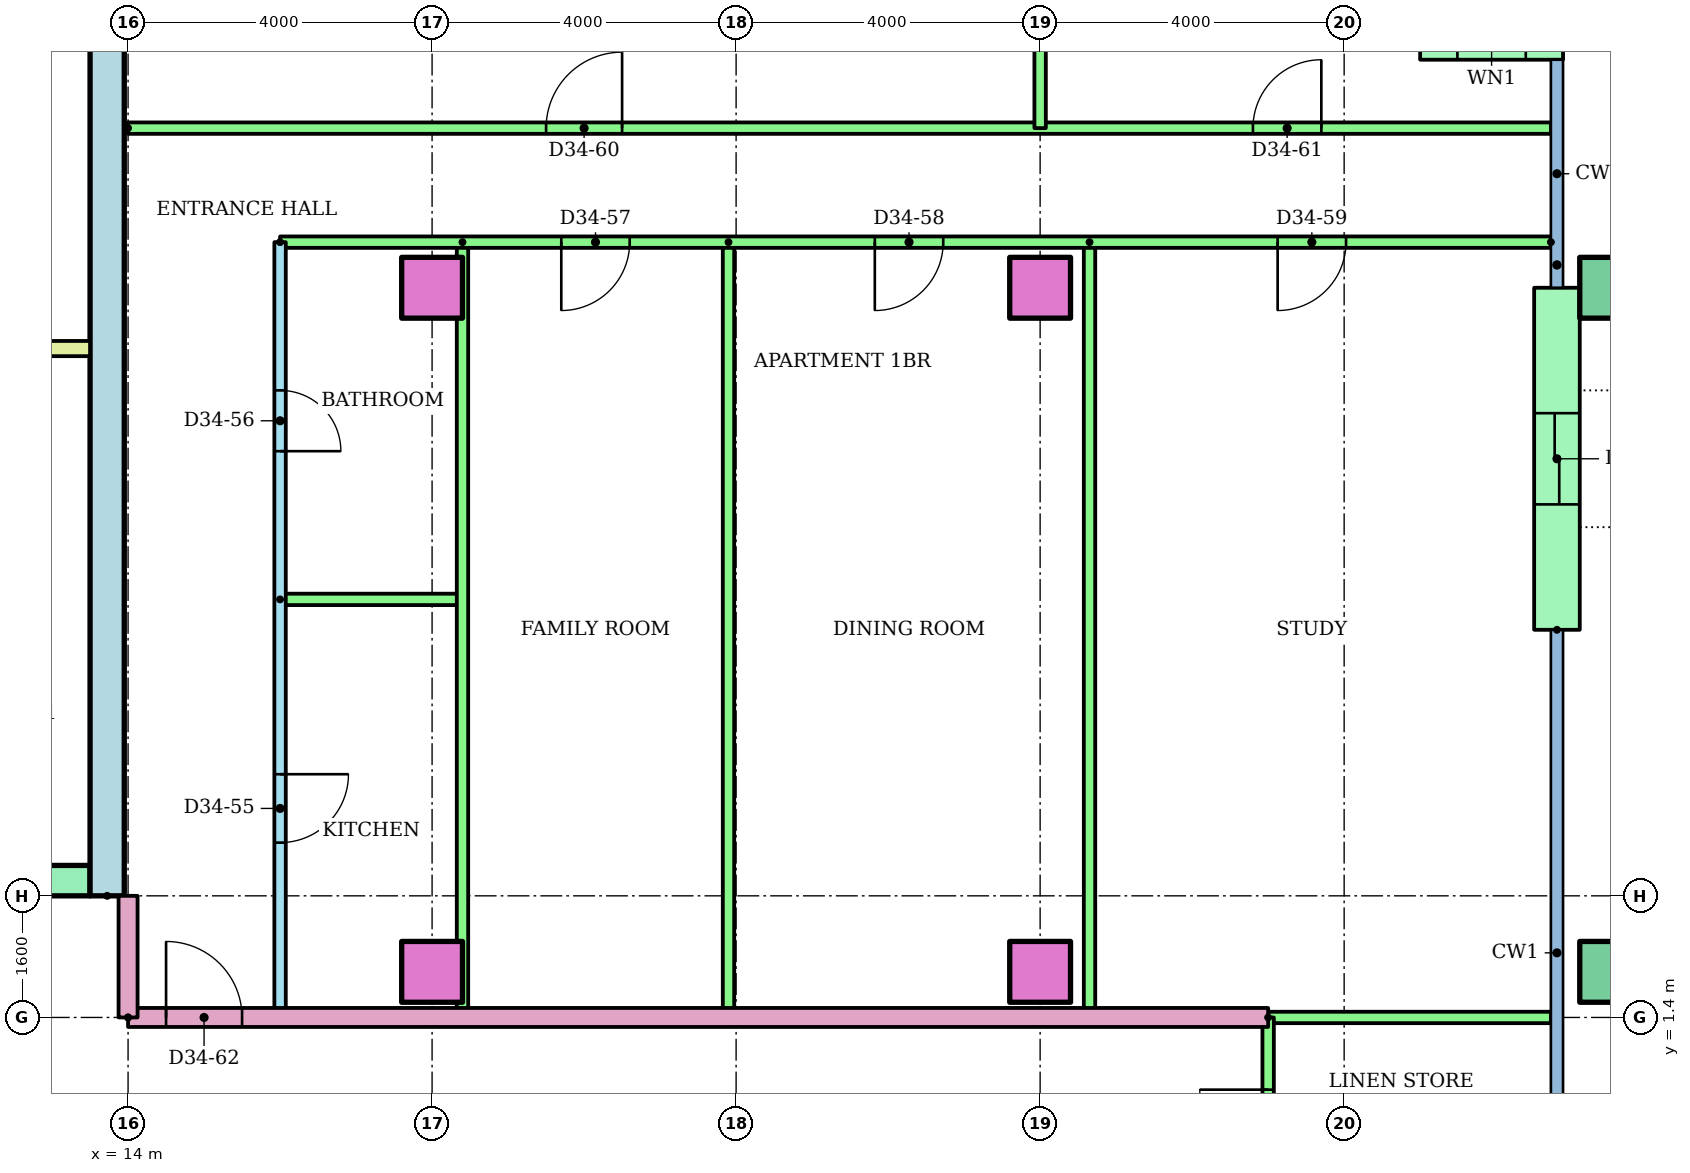
"""IFC4 building model, lengths in metres.
Left out: names, types, materials, properties, quantities, classifications, styles, units other than length and angle.
Written with IfcOpenShell. Run it as: python <this file> out.ifc"""

import sys

from ifc_helpers import new_model, si_unit, direction, frame, frame_2d, origin, origin_2d, place, context, subcontext, project, spatial, rectangle, hollow_rectangle, extrude, element, fill, save


model = new_model("IFC4")
c1 = context("Model", 3, precision=1e-05, world=origin(), true_north=direction((0.0, 1.0)))
c2 = subcontext(c1, "Body", "Model", "MODEL_VIEW")
j1 = project(units=[si_unit("LENGTHUNIT", "METRE"), si_unit("PLANEANGLEUNIT", "RADIAN")], contexts=[c1])
p1 = place(None, origin())
s1 = spatial("IfcSite", under=j1, at=p1, CompositionType="ELEMENT")
p2 = place(p1, origin())
s2 = spatial("IfcBuilding", under=s1, at=p2, CompositionType="ELEMENT")
p3 = place(p2, frame((0.0, 0.0, 132.6)))
s3 = spatial("IfcBuildingStorey", under=s2, at=p3, CompositionType="ELEMENT", Elevation=132.6)
for number, where in (
    (1, (18.0, 2.0, 0.0)),
    (2, (26.0, 2.0, 0.0)),
):
    element("IfcColumn", number, at=place(p3, frame(where)), inside=s3, PredefinedType="COLUMN", context=c2, shape_type="SweptSolid", body=[
        extrude(rectangle(XDim=0.8, YDim=0.8, at=origin_2d()), origin(), (0.0, 0.0, 1.0), 3.2),
    ])
p4 = place(p3, frame((33.5, 2.0, 0.0)))
e3 = element("IfcColumn", 3, at=p4, inside=s3, PredefinedType="COLUMN", context=c2, shape_type="SweptSolid", body=[
    extrude(hollow_rectangle(XDim=0.8, YDim=0.8, WallThickness=0.04, at=origin_2d()), origin(), (0.0, 0.0, 1.0), 3.2),
])
for number, where in (
    (4, (18.0, 11.0, 0.0)),
    (5, (26.0, 11.0, 0.0)),
):
    element("IfcColumn", number, at=place(p3, frame(where)), inside=s3, PredefinedType="COLUMN", context=c2, shape_type="SweptSolid", body=[
        extrude(rectangle(XDim=0.8, YDim=0.8, at=origin_2d()), origin(), (0.0, 0.0, 1.0), 3.2),
    ])
p5 = place(p3, frame((33.5, 11.0, 0.0)))
e6 = element("IfcColumn", 6, at=p5, inside=s3, PredefinedType="COLUMN", context=c2, shape_type="SweptSolid", body=[
    extrude(hollow_rectangle(XDim=0.8, YDim=0.8, WallThickness=0.04, at=origin_2d()), origin(), (0.0, 0.0, 1.0), 3.2),
])
p6 = place(p3, frame((32.88, 14.3, 0.0), z_axis=(0.0, 0.0, 1.0), x_axis=(-1.0, 0.0, 0.0)))
e7 = element("IfcWall", 7, at=p6, inside=s3, PredefinedType="STANDARD", context=c2, shape_type="SweptSolid", body=[
    extrude(rectangle(XDim=1.88, YDim=0.6, at=frame_2d((0.94, 0.0))), origin(), (0.0, 0.0, 1.0), 2.92),
])
p7 = place(p6, frame((0.49, 0.0, 0.9)))
e8 = element("IfcOpeningElement", 8, at=p7, cuts=e7, PredefinedType="OPENING", context=c2, shape_type="SweptSolid", body=[
    extrude(rectangle(XDim=0.9, YDim=1.5, at=frame_2d((0.45, 0.75))), frame((0.0, 0.31, 0.0), z_axis=(0.0, -1.0, 0.0), x_axis=(1.0, 0.0, 0.0)), (0.0, 0.0, 1.0), 0.62),
])
p8 = place(p3, frame((32.8, 6.5, 0.0), z_axis=(0.0, 0.0, 1.0), x_axis=(0.0, 1.0, 0.0)))
e9 = element("IfcWall", 9, at=p8, inside=s3, PredefinedType="STANDARD", context=c2, shape_type="SweptSolid", body=[
    extrude(rectangle(XDim=4.5, YDim=0.6, at=frame_2d((2.25, 0.0))), origin(), (0.0, 0.0, 1.0), 2.92),
])
p9 = place(p8, frame((1.65, 0.0, 0.0)))
e10 = element("IfcOpeningElement", 10, at=p9, cuts=e9, PredefinedType="OPENING", context=c2, shape_type="SweptSolid", body=[
    extrude(rectangle(XDim=1.2, YDim=2.1, at=frame_2d((0.6, 1.05))), frame((0.0, 0.31, 0.0), z_axis=(0.0, -1.0, 0.0), x_axis=(1.0, 0.0, 0.0)), (0.0, 0.0, 1.0), 0.62),
])
p10 = place(p3, frame((13.725, 3.0, 0.0), z_axis=(0.0, 0.0, 1.0), x_axis=(0.0, 1.0, 0.0)))
e11 = element("IfcWall", 11, at=p10, inside=s3, PredefinedType="SHEAR", context=c2, shape_type="SweptSolid", body=[
    extrude(rectangle(XDim=17.0, YDim=0.45, at=frame_2d((8.5, 0.0))), origin(), (0.0, 0.0, 1.0), 2.92),
])
p11 = place(p3, frame((-13.5, 3.2, 0.0)))
e12 = element("IfcWall", 12, at=p11, inside=s3, PredefinedType="SHEAR", context=c2, shape_type="SweptSolid", body=[
    extrude(rectangle(XDim=27.0, YDim=0.4, at=frame_2d((13.5, 0.0))), origin(), (0.0, 0.0, 1.0), 2.92),
])
p12 = place(p11, frame((6.861, 0.0, 0.0)))
e13 = element("IfcOpeningElement", 13, at=p12, cuts=e12, PredefinedType="OPENING", context=c2, shape_type="SweptSolid", body=[
    extrude(rectangle(XDim=1.1, YDim=2.1, at=frame_2d((0.55, 1.05))), frame((0.0, 0.21, 0.0), z_axis=(0.0, -1.0, 0.0), x_axis=(1.0, 0.0, 0.0)), (0.0, 0.0, 1.0), 0.42),
])
p13 = place(p11, frame((9.906, 0.0, 0.0)))
e14 = element("IfcOpeningElement", 14, at=p13, cuts=e12, PredefinedType="OPENING", context=c2, shape_type="SweptSolid", body=[
    extrude(rectangle(XDim=1.1, YDim=2.1, at=frame_2d((0.55, 1.05))), frame((0.0, 0.21, 0.0), z_axis=(0.0, -1.0, 0.0), x_axis=(1.0, 0.0, 0.0)), (0.0, 0.0, 1.0), 0.42),
])
p14 = place(p11, frame((15.994, 0.0, 0.0)))
e15 = element("IfcOpeningElement", 15, at=p14, cuts=e12, PredefinedType="OPENING", context=c2, shape_type="SweptSolid", body=[
    extrude(rectangle(XDim=1.1, YDim=2.1, at=frame_2d((0.55, 1.05))), frame((0.0, 0.21, 0.0), z_axis=(0.0, -1.0, 0.0), x_axis=(1.0, 0.0, 0.0)), (0.0, 0.0, 1.0), 0.42),
])
p15 = place(p11, frame((19.039, 0.0, 0.0)))
e16 = element("IfcOpeningElement", 16, at=p15, cuts=e12, PredefinedType="OPENING", context=c2, shape_type="SweptSolid", body=[
    extrude(rectangle(XDim=1.1, YDim=2.1, at=frame_2d((0.55, 1.05))), frame((0.0, 0.21, 0.0), z_axis=(0.0, -1.0, 0.0), x_axis=(1.0, 0.0, 0.0)), (0.0, 0.0, 1.0), 0.42),
])
p16 = place(p11, frame((12.6, 0.0, 0.0)))
e17 = element("IfcOpeningElement", 17, at=p16, cuts=e12, PredefinedType="OPENING", context=c2, shape_type="SweptSolid", body=[
    extrude(rectangle(XDim=1.8, YDim=2.1, at=frame_2d((0.9, 1.05))), frame((0.0, 0.21, 0.0), z_axis=(0.0, -1.0, 0.0), x_axis=(1.0, 0.0, 0.0)), (0.0, 0.0, 1.0), 0.42),
])
p17 = place(p3, frame((9.6, 10.2, 0.0)))
e18 = element("IfcWall", 18, at=p17, inside=s3, PredefinedType="PARTITIONING", context=c2, shape_type="SweptSolid", body=[
    extrude(rectangle(XDim=3.9, YDim=0.2, at=frame_2d((1.95, 0.0))), origin(), (0.0, 0.0, 1.0), 2.92),
])
p18 = place(p3, frame((16.0, 11.6, 0.0), z_axis=(0.0, 0.0, 1.0), x_axis=(0.0, -1.0, 0.0)))
e19 = element("IfcWall", 19, at=p18, inside=s3, PredefinedType="PARTITIONING", context=c2, shape_type="SweptSolid", body=[
    extrude(rectangle(XDim=10.2, YDim=0.15, at=frame_2d((5.1, 0.0))), origin(), (0.0, 0.0, 1.0), 2.4),
])
p19 = place(p18, frame((7.0, 0.0, 0.0)))
e20 = element("IfcOpeningElement", 20, at=p19, cuts=e19, PredefinedType="OPENING", context=c2, shape_type="SweptSolid", body=[
    extrude(rectangle(XDim=0.9, YDim=2.1, at=frame_2d((0.45, 1.05))), frame((0.0, 0.085, 0.0), z_axis=(0.0, -1.0, 0.0), x_axis=(1.0, 0.0, 0.0)), (0.0, 0.0, 1.0), 0.17),
])
p20 = place(p18, frame((1.95, 0.0, 0.0)))
e21 = element("IfcOpeningElement", 21, at=p20, cuts=e19, PredefinedType="OPENING", context=c2, shape_type="SweptSolid", body=[
    extrude(rectangle(XDim=0.8, YDim=2.1, at=frame_2d((0.4, 1.05))), frame((0.0, 0.085, 0.0), z_axis=(0.0, -1.0, 0.0), x_axis=(1.0, 0.0, 0.0)), (0.0, 0.0, 1.0), 0.17),
])
p21 = place(p3, frame((16.0, 6.9, 0.0)))
e22 = element("IfcWall", 22, at=p21, inside=s3, PredefinedType="PARTITIONING", context=c2, shape_type="SweptSolid", body=[
    extrude(rectangle(XDim=2.4, YDim=0.15, at=frame_2d((1.2, 0.0))), origin(), (0.0, 0.0, 1.0), 2.4),
])
for number, where, z_axis, x_axis in (
    (23, (18.4, 11.6, 0.0), (0.0, 0.0, 1.0), (0.0, -1.0, 0.0)),
    (24, (21.9, 11.6, 0.0), (0.0, 0.0, 1.0), (0.0, -1.0, 0.0)),
    (25, (26.65, 11.6, 0.0), (0.0, 0.0, 1.0), (0.0, -1.0, 0.0)),
):
    element("IfcWall", number, at=place(p3, frame(where, z_axis=z_axis, x_axis=x_axis)), inside=s3, PredefinedType="PARTITIONING", context=c2, shape_type="SweptSolid", body=[
        extrude(rectangle(XDim=10.2, YDim=0.15, at=frame_2d((5.1, 0.0))), origin(), (0.0, 0.0, 1.0), 2.4),
    ])
p22 = place(p3, frame((32.72, 11.6, 0.0), z_axis=(0.0, 0.0, 1.0), x_axis=(-1.0, 0.0, 0.0)))
e26 = element("IfcWall", 26, at=p22, inside=s3, PredefinedType="PARTITIONING", context=c2, shape_type="SweptSolid", body=[
    extrude(rectangle(XDim=16.72, YDim=0.15, at=frame_2d((8.36, 0.0))), origin(), (0.0, 0.0, 1.0), 2.4),
])
p23 = place(p22, frame((12.12, 0.0, 0.0)))
e27 = element("IfcOpeningElement", 27, at=p23, cuts=e26, PredefinedType="OPENING", context=c2, shape_type="SweptSolid", body=[
    extrude(rectangle(XDim=0.9, YDim=2.1, at=frame_2d((0.45, 1.05))), frame((0.0, 0.085, 0.0), z_axis=(0.0, -1.0, 0.0), x_axis=(1.0, 0.0, 0.0)), (0.0, 0.0, 1.0), 0.17),
])
p24 = place(p22, frame((7.995, 0.0, 0.0)))
e28 = element("IfcOpeningElement", 28, at=p24, cuts=e26, PredefinedType="OPENING", context=c2, shape_type="SweptSolid", body=[
    extrude(rectangle(XDim=0.9, YDim=2.1, at=frame_2d((0.45, 1.05))), frame((0.0, 0.085, 0.0), z_axis=(0.0, -1.0, 0.0), x_axis=(1.0, 0.0, 0.0)), (0.0, 0.0, 1.0), 0.17),
])
p25 = place(p22, frame((2.695, 0.0, 0.0)))
e29 = element("IfcOpeningElement", 29, at=p25, cuts=e26, PredefinedType="OPENING", context=c2, shape_type="SweptSolid", body=[
    extrude(rectangle(XDim=0.9, YDim=2.1, at=frame_2d((0.45, 1.05))), frame((0.0, 0.085, 0.0), z_axis=(0.0, -1.0, 0.0), x_axis=(1.0, 0.0, 0.0)), (0.0, 0.0, 1.0), 0.17),
])
p26 = place(p3, frame((14.0, 13.1, 0.0)))
e30 = element("IfcWall", 30, at=p26, inside=s3, PredefinedType="PARTITIONING", context=c2, shape_type="SweptSolid", body=[
    extrude(rectangle(XDim=18.72, YDim=0.15, at=frame_2d((9.36, 0.0))), origin(), (0.0, 0.0, 1.0), 2.4),
])
p27 = place(p26, frame((5.5, 0.0, 0.0)))
e31 = element("IfcOpeningElement", 31, at=p27, cuts=e30, PredefinedType="OPENING", context=c2, shape_type="SweptSolid", body=[
    extrude(rectangle(XDim=1.0, YDim=2.1, at=frame_2d((0.5, 1.05))), frame((0.0, 0.085, 0.0), z_axis=(0.0, -1.0, 0.0), x_axis=(1.0, 0.0, 0.0)), (0.0, 0.0, 1.0), 0.17),
])
p28 = place(p26, frame((14.8, 0.0, 0.0)))
e32 = element("IfcOpeningElement", 32, at=p28, cuts=e30, PredefinedType="OPENING", context=c2, shape_type="SweptSolid", body=[
    extrude(rectangle(XDim=0.9, YDim=2.1, at=frame_2d((0.45, 1.05))), frame((0.0, 0.085, 0.0), z_axis=(0.0, -1.0, 0.0), x_axis=(1.0, 0.0, 0.0)), (0.0, 0.0, 1.0), 0.17),
])
p29 = place(p3, frame((26.0, 18.721, 0.0), z_axis=(0.0, 0.0, 1.0), x_axis=(0.0, -1.0, 0.0)))
e33 = element("IfcWall", 33, at=p29, inside=s3, PredefinedType="PARTITIONING", context=c2, shape_type="SweptSolid", body=[
    extrude(rectangle(XDim=5.621, YDim=0.15, at=frame_2d((2.811, 0.0))), origin(), (0.0, 0.0, 1.0), 2.4),
])
p30 = place(p3, frame((14.0, 1.4, 0.0)))
e34 = element("IfcWall", 34, at=p30, inside=s3, PredefinedType="PARTITIONING", context=c2, shape_type="SweptSolid", body=[
    extrude(rectangle(XDim=15.0, YDim=0.25, at=frame_2d((7.5, 0.0))), origin(), (0.0, 0.0, 1.0), 2.4),
])
p31 = place(p30, frame((0.5, 0.0, 0.0)))
e35 = element("IfcOpeningElement", 35, at=p31, cuts=e34, PredefinedType="OPENING", context=c2, shape_type="SweptSolid", body=[
    extrude(rectangle(XDim=1.0, YDim=2.1, at=frame_2d((0.5, 1.05))), frame((0.0, 0.135, 0.0), z_axis=(0.0, -1.0, 0.0), x_axis=(1.0, 0.0, 0.0)), (0.0, 0.0, 1.0), 0.27),
])
p32 = place(p3, frame((29.0, 1.4, 0.0)))
e36 = element("IfcWall", 36, at=p32, inside=s3, PredefinedType="PARTITIONING", context=c2, shape_type="SweptSolid", body=[
    extrude(rectangle(XDim=3.72, YDim=0.15, at=frame_2d((1.86, 0.0))), origin(), (0.0, 0.0, 1.0), 2.4),
])
p33 = place(p3, frame((29.0, -1.4, 0.0), z_axis=(0.0, 0.0, 1.0), x_axis=(0.0, 1.0, 0.0)))
e37 = element("IfcWall", 37, at=p33, inside=s3, PredefinedType="PARTITIONING", context=c2, shape_type="SweptSolid", body=[
    extrude(rectangle(XDim=2.8, YDim=0.15, at=frame_2d((1.4, 0.0))), origin(), (0.0, 0.0, 1.0), 2.4),
])
p34 = place(p33, frame((0.95, 0.0, 0.0)))
e38 = element("IfcOpeningElement", 38, at=p34, cuts=e37, PredefinedType="OPENING", context=c2, shape_type="SweptSolid", body=[
    extrude(rectangle(XDim=0.9, YDim=2.1, at=frame_2d((0.45, 1.05))), frame((0.0, 0.085, 0.0), z_axis=(0.0, -1.0, 0.0), x_axis=(1.0, 0.0, 0.0)), (0.0, 0.0, 1.0), 0.17),
])
p35 = place(p3, frame((14.0, 1.4, 0.0), z_axis=(0.0, 0.0, 1.0), x_axis=(0.0, 1.0, 0.0)))
e39 = element("IfcWall", 39, at=p35, inside=s3, PredefinedType="PARTITIONING", context=c2, shape_type="SweptSolid", body=[
    extrude(rectangle(XDim=1.6, YDim=0.25, at=frame_2d((0.8, 0.0))), origin(), (0.0, 0.0, 1.0), 2.4),
])
p36 = place(p19, origin())
e40 = element("IfcDoor", 40, at=p36, inside=s3, OperationType="SINGLE_SWING_LEFT", PredefinedType="DOOR", context=c2, shape_type="SweptSolid", body=[
    extrude(rectangle(XDim=0.9, YDim=2.1, at=frame_2d((0.45, 1.05))), frame((0.0, 0.025, 0.0), z_axis=(0.0, -1.0, 0.0), x_axis=(1.0, 0.0, 0.0)), (0.0, 0.0, 1.0), 0.05),
])
fill(e20, e40)
p37 = place(p20, origin())
e41 = element("IfcDoor", 41, at=p37, inside=s3, OperationType="SINGLE_SWING_RIGHT", PredefinedType="DOOR", context=c2, shape_type="SweptSolid", body=[
    extrude(rectangle(XDim=0.8, YDim=2.1, at=frame_2d((0.4, 1.05))), frame((0.0, 0.025, 0.0), z_axis=(0.0, -1.0, 0.0), x_axis=(1.0, 0.0, 0.0)), (0.0, 0.0, 1.0), 0.05),
])
fill(e21, e41)
p38 = place(p23, origin())
e42 = element("IfcDoor", 42, at=p38, inside=s3, OperationType="SINGLE_SWING_RIGHT", PredefinedType="DOOR", context=c2, shape_type="SweptSolid", body=[
    extrude(rectangle(XDim=0.9, YDim=2.1, at=frame_2d((0.45, 1.05))), frame((0.0, 0.025, 0.0), z_axis=(0.0, -1.0, 0.0), x_axis=(1.0, 0.0, 0.0)), (0.0, 0.0, 1.0), 0.05),
])
fill(e27, e42)
p39 = place(p24, origin())
e43 = element("IfcDoor", 43, at=p39, inside=s3, OperationType="SINGLE_SWING_RIGHT", PredefinedType="DOOR", context=c2, shape_type="SweptSolid", body=[
    extrude(rectangle(XDim=0.9, YDim=2.1, at=frame_2d((0.45, 1.05))), frame((0.0, 0.025, 0.0), z_axis=(0.0, -1.0, 0.0), x_axis=(1.0, 0.0, 0.0)), (0.0, 0.0, 1.0), 0.05),
])
fill(e28, e43)
p40 = place(p25, origin())
e44 = element("IfcDoor", 44, at=p40, inside=s3, OperationType="SINGLE_SWING_RIGHT", PredefinedType="DOOR", context=c2, shape_type="SweptSolid", body=[
    extrude(rectangle(XDim=0.9, YDim=2.1, at=frame_2d((0.45, 1.05))), frame((0.0, 0.025, 0.0), z_axis=(0.0, -1.0, 0.0), x_axis=(1.0, 0.0, 0.0)), (0.0, 0.0, 1.0), 0.05),
])
fill(e29, e44)
p41 = place(p27, origin())
e45 = element("IfcDoor", 45, at=p41, inside=s3, OperationType="SINGLE_SWING_RIGHT", PredefinedType="DOOR", context=c2, shape_type="SweptSolid", body=[
    extrude(rectangle(XDim=1.0, YDim=2.1, at=frame_2d((0.5, 1.05))), frame((0.0, 0.025, 0.0), z_axis=(0.0, -1.0, 0.0), x_axis=(1.0, 0.0, 0.0)), (0.0, 0.0, 1.0), 0.05),
])
fill(e31, e45)
p42 = place(p28, origin())
e46 = element("IfcDoor", 46, at=p42, inside=s3, OperationType="SINGLE_SWING_RIGHT", PredefinedType="DOOR", context=c2, shape_type="SweptSolid", body=[
    extrude(rectangle(XDim=0.9, YDim=2.1, at=frame_2d((0.45, 1.05))), frame((0.0, 0.025, 0.0), z_axis=(0.0, -1.0, 0.0), x_axis=(1.0, 0.0, 0.0)), (0.0, 0.0, 1.0), 0.05),
])
fill(e32, e46)
p43 = place(p31, origin())
e47 = element("IfcDoor", 47, at=p43, inside=s3, OperationType="SINGLE_SWING_LEFT", PredefinedType="DOOR", context=c2, shape_type="SweptSolid", body=[
    extrude(rectangle(XDim=1.0, YDim=2.1, at=frame_2d((0.5, 1.05))), frame((0.0, 0.025, 0.0), z_axis=(0.0, -1.0, 0.0), x_axis=(1.0, 0.0, 0.0)), (0.0, 0.0, 1.0), 0.05),
])
fill(e35, e47)
p44 = place(p34, origin())
e48 = element("IfcDoor", 48, at=p44, inside=s3, OperationType="SINGLE_SWING_RIGHT", PredefinedType="DOOR", context=c2, shape_type="SweptSolid", body=[
    extrude(rectangle(XDim=0.9, YDim=2.1, at=frame_2d((0.45, 1.05))), frame((0.0, 0.025, 0.0), z_axis=(0.0, -1.0, 0.0), x_axis=(1.0, 0.0, 0.0)), (0.0, 0.0, 1.0), 0.05),
])
fill(e38, e48)
p45 = place(p9, origin())
e49 = element("IfcDoor", 49, at=p45, inside=s3, OperationType="SLIDING_TO_LEFT", PredefinedType="DOOR", context=c2, shape_type="SweptSolid", body=[
    extrude(rectangle(XDim=1.2, YDim=2.1, at=frame_2d((0.6, 1.05))), frame((0.0, 0.025, 0.0), z_axis=(0.0, -1.0, 0.0), x_axis=(1.0, 0.0, 0.0)), (0.0, 0.0, 1.0), 0.05),
])
fill(e10, e49)
save(model, sys.argv[1])
